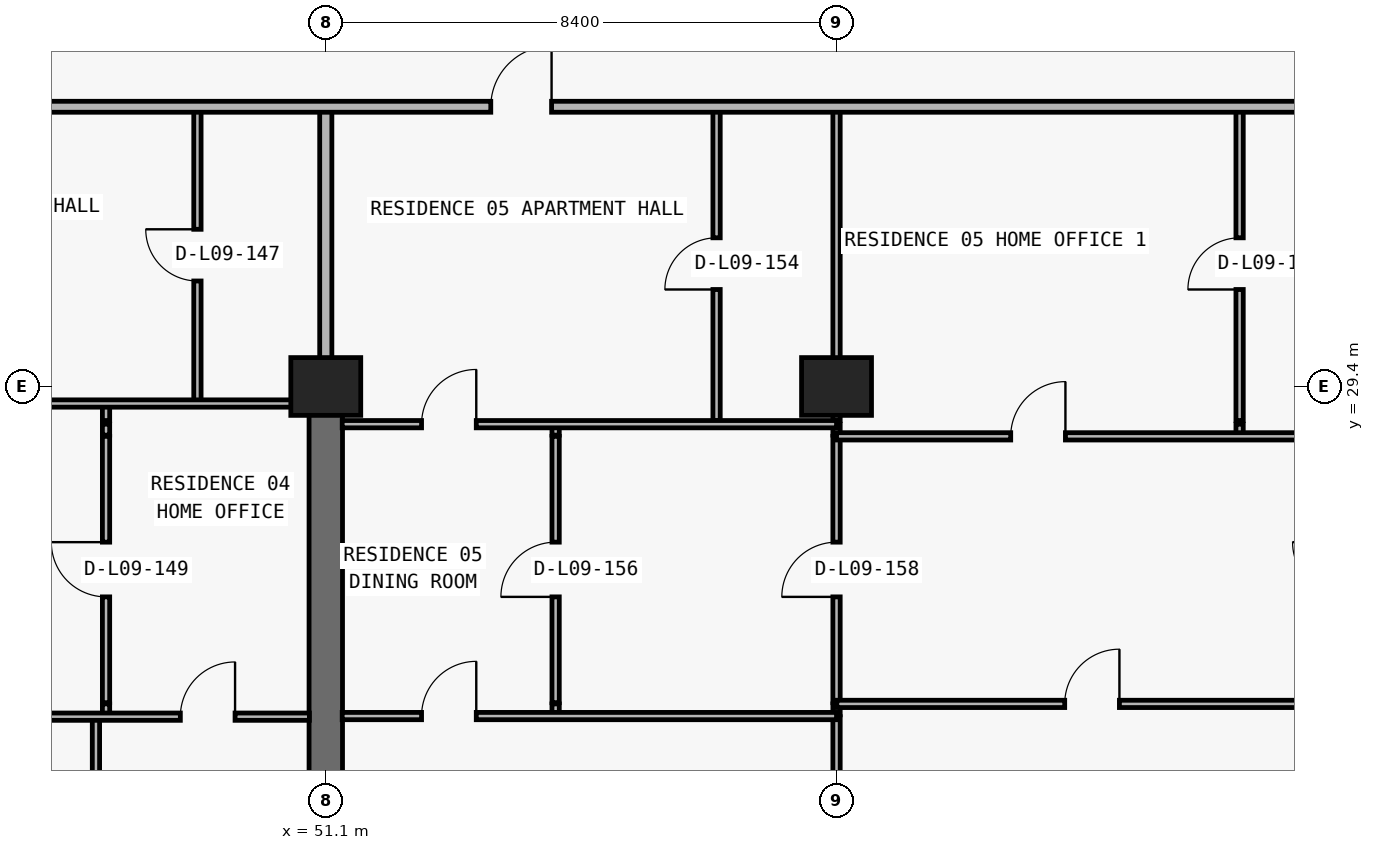
"""IFC4 building model, lengths in metres.
Left out: names, types, materials, properties, quantities, classifications, styles, units other than length and angle.
Written with IfcOpenShell. Run it as: python <this file> out.ifc"""

import sys

from ifc_helpers import new_model, si_unit, direction, frame, frame_2d, origin, origin_2d, place, context, subcontext, project, spatial, rectangle, extrude, element, fill, save


model = new_model("IFC4")
c1 = context("Model", 3, precision=1e-05, world=origin(), true_north=direction((0.0, 1.0)))
c2 = subcontext(c1, "Body", "Model", "MODEL_VIEW")
j1 = project(units=[si_unit("LENGTHUNIT", "METRE"), si_unit("PLANEANGLEUNIT", "RADIAN")], contexts=[c1])
p1 = place(None, origin())
s1 = spatial("IfcSite", under=j1, at=p1, CompositionType="ELEMENT")
p2 = place(p1, origin())
s2 = spatial("IfcBuilding", under=s1, at=p2, CompositionType="ELEMENT")
p3 = place(p2, frame((0.0, 0.0, 39.9)))
s3 = spatial("IfcBuildingStorey", under=s2, at=p3, CompositionType="ELEMENT", Elevation=39.9)
for number, where, z_axis, x_axis in (
    (1, (51.1, 29.4, 0.0), (0.0, 0.0, 1.0), (1.0, 0.0, 0.0)),
    (2, (59.5, 29.4, 0.0), (0.0, 0.0, 1.0), (1.0, 0.0, 0.0)),
):
    element("IfcColumn", number, at=place(p3, frame(where, z_axis=z_axis, x_axis=x_axis)), inside=s3, PredefinedType="COLUMN", context=c2, shape_type="SweptSolid", body=[
        extrude(rectangle(XDim=1.15, YDim=0.95, at=origin_2d()), origin(), (0.0, 0.0, 1.0), 3.05),
    ])
p4 = place(p3, frame((51.1, 20.8, 0.0), z_axis=(0.0, 0.0, 1.0), x_axis=(0.0, 1.0, 0.0)))
e3 = element("IfcWall", 3, at=p4, inside=s3, PredefinedType="SHEAR", context=c2, shape_type="SweptSolid", body=[
    extrude(rectangle(XDim=8.6, YDim=0.55, at=frame_2d((4.3, 0.0))), origin(), (0.0, 0.0, 1.0), 3.05),
])
p5 = place(p3, frame((47.32, 6.24, 0.0), z_axis=(0.0, 0.0, 1.0), x_axis=(0.0, 1.0, 0.0)))
e4 = element("IfcWall", 4, at=p5, inside=s3, PredefinedType="PARTITIONING", context=c2, shape_type="SweptSolid", body=[
    extrude(rectangle(XDim=17.73, YDim=0.12, at=frame_2d((8.865, 0.0))), origin(), (0.0, 0.0, 1.0), 3.05),
])
p6 = place(p3, frame((47.486, 24.0, 0.0), z_axis=(0.0, 0.0, 1.0), x_axis=(0.0, 1.0, 0.0)))
e5 = element("IfcWall", 5, at=p6, inside=s3, PredefinedType="PARTITIONING", context=c2, shape_type="SweptSolid", body=[
    extrude(rectangle(XDim=0.18, YDim=0.12, at=frame_2d((0.09, 0.0))), origin(), (0.0, 0.0, 1.0), 3.05),
])
p7 = place(p3, frame((47.486, 24.2, 0.0), z_axis=(0.0, 0.0, 1.0), x_axis=(0.0, 1.0, 0.0)))
e6 = element("IfcWall", 6, at=p7, inside=s3, PredefinedType="PARTITIONING", context=c2, shape_type="SweptSolid", body=[
    extrude(rectangle(XDim=4.38, YDim=0.12, at=frame_2d((2.19, 0.0))), origin(), (0.0, 0.0, 1.0), 3.05),
])
p8 = place(p7, frame((1.74, 0.0, 0.0)))
e7 = element("IfcOpeningElement", 7, at=p8, cuts=e6, PredefinedType="OPENING", context=c2, shape_type="SweptSolid", body=[
    extrude(rectangle(XDim=0.9, YDim=2.15, at=frame_2d((0.45, 1.075))), frame((0.0, 0.07, 0.0), z_axis=(0.0, -1.0, 0.0), x_axis=(1.0, 0.0, 0.0)), (0.0, 0.0, 1.0), 0.14),
])
p9 = place(p3, frame((47.486, 28.6, 0.0), z_axis=(0.0, 0.0, 1.0), x_axis=(0.0, 1.0, 0.0)))
e8 = element("IfcWall", 8, at=p9, inside=s3, PredefinedType="PARTITIONING", context=c2, shape_type="SweptSolid", body=[
    extrude(rectangle(XDim=0.18, YDim=0.12, at=frame_2d((0.09, 0.0))), origin(), (0.0, 0.0, 1.0), 3.05),
])
p10 = place(p3, frame((47.486, 28.84, 0.0), z_axis=(0.0, 0.0, 1.0), x_axis=(0.0, 1.0, 0.0)))
e9 = element("IfcWall", 9, at=p10, inside=s3, PredefinedType="PARTITIONING", context=c2, shape_type="SweptSolid", body=[
    extrude(rectangle(XDim=0.28, YDim=0.12, at=frame_2d((0.14, 0.0))), origin(), (0.0, 0.0, 1.0), 3.05),
])
p11 = place(p3, frame((48.989, 29.12, 0.0), z_axis=(0.0, 0.0, 1.0), x_axis=(0.0, 1.0, 0.0)))
e10 = element("IfcWall", 10, at=p11, inside=s3, PredefinedType="PARTITIONING", context=c2, shape_type="SweptSolid", body=[
    extrude(rectangle(XDim=4.88, YDim=0.12, at=frame_2d((2.44, 0.0))), origin(), (0.0, 0.0, 1.0), 2.578),
])
p12 = place(p11, frame((2.015, 0.0, 0.0)))
e11 = element("IfcOpeningElement", 11, at=p12, cuts=e10, PredefinedType="OPENING", context=c2, shape_type="SweptSolid", body=[
    extrude(rectangle(XDim=0.85, YDim=2.1, at=frame_2d((0.425, 1.05))), frame((0.0, 0.07, 0.0), z_axis=(0.0, -1.0, 0.0), x_axis=(1.0, 0.0, 0.0)), (0.0, 0.0, 1.0), 0.14),
])
p13 = place(p3, frame((51.1, 29.405, 0.0), z_axis=(0.0, 0.0, 1.0), x_axis=(0.0, 1.0, 0.0)))
e12 = element("IfcWall", 12, at=p13, inside=s3, PredefinedType="PARTITIONING", context=c2, shape_type="SweptSolid", body=[
    extrude(rectangle(XDim=4.595, YDim=0.2, at=frame_2d((2.297, 0.0))), origin(), (0.0, 0.0, 1.0), 2.335),
])
p14 = place(p3, frame((54.88, 24.0, 0.0), z_axis=(0.0, 0.0, 1.0), x_axis=(0.0, 1.0, 0.0)))
e13 = element("IfcWall", 13, at=p14, inside=s3, PredefinedType="PARTITIONING", context=c2, shape_type="SweptSolid", body=[
    extrude(rectangle(XDim=0.18, YDim=0.12, at=frame_2d((0.09, 0.0))), origin(), (0.0, 0.0, 1.0), 3.05),
])
p15 = place(p3, frame((54.88, 24.2, 0.0), z_axis=(0.0, 0.0, 1.0), x_axis=(0.0, 1.0, 0.0)))
e14 = element("IfcWall", 14, at=p15, inside=s3, PredefinedType="PARTITIONING", context=c2, shape_type="SweptSolid", body=[
    extrude(rectangle(XDim=4.38, YDim=0.12, at=frame_2d((2.19, 0.0))), origin(), (0.0, 0.0, 1.0), 3.05),
])
p16 = place(p15, frame((1.74, 0.0, 0.0)))
e15 = element("IfcOpeningElement", 15, at=p16, cuts=e14, PredefinedType="OPENING", context=c2, shape_type="SweptSolid", body=[
    extrude(rectangle(XDim=0.9, YDim=2.15, at=frame_2d((0.45, 1.075))), frame((0.0, 0.07, 0.0), z_axis=(0.0, -1.0, 0.0), x_axis=(1.0, 0.0, 0.0)), (0.0, 0.0, 1.0), 0.14),
])
p17 = place(p3, frame((54.88, 28.6, 0.0), z_axis=(0.0, 0.0, 1.0), x_axis=(0.0, 1.0, 0.0)))
e16 = element("IfcWall", 16, at=p17, inside=s3, PredefinedType="PARTITIONING", context=c2, shape_type="SweptSolid", body=[
    extrude(rectangle(XDim=0.18, YDim=0.12, at=frame_2d((0.09, 0.0))), origin(), (0.0, 0.0, 1.0), 3.05),
])
p18 = place(p3, frame((57.527, 28.84, 0.0), z_axis=(0.0, 0.0, 1.0), x_axis=(0.0, 1.0, 0.0)))
e17 = element("IfcWall", 17, at=p18, inside=s3, PredefinedType="PARTITIONING", context=c2, shape_type="SweptSolid", body=[
    extrude(rectangle(XDim=5.16, YDim=0.12, at=frame_2d((2.58, 0.0))), origin(), (0.0, 0.0, 1.0), 2.578),
])
p19 = place(p18, frame((2.155, 0.0, 0.0)))
e18 = element("IfcOpeningElement", 18, at=p19, cuts=e17, PredefinedType="OPENING", context=c2, shape_type="SweptSolid", body=[
    extrude(rectangle(XDim=0.85, YDim=2.1, at=frame_2d((0.425, 1.05))), frame((0.0, 0.07, 0.0), z_axis=(0.0, -1.0, 0.0), x_axis=(1.0, 0.0, 0.0)), (0.0, 0.0, 1.0), 0.14),
])
p20 = place(p3, frame((59.5, 6.24, 0.0), z_axis=(0.0, 0.0, 1.0), x_axis=(0.0, 1.0, 0.0)))
e19 = element("IfcWall", 19, at=p20, inside=s3, PredefinedType="PARTITIONING", context=c2, shape_type="SweptSolid", body=[
    extrude(rectangle(XDim=17.73, YDim=0.12, at=frame_2d((8.865, 0.0))), origin(), (0.0, 0.0, 1.0), 2.11),
])
p21 = place(p3, frame((59.5, 24.0, 0.0), z_axis=(0.0, 0.0, 1.0), x_axis=(0.0, 1.0, 0.0)))
e20 = element("IfcWall", 20, at=p21, inside=s3, PredefinedType="PARTITIONING", context=c2, shape_type="SweptSolid", body=[
    extrude(rectangle(XDim=0.18, YDim=0.12, at=frame_2d((0.09, 0.0))), origin(), (0.0, 0.0, 1.0), 2.11),
])
p22 = place(p3, frame((59.5, 24.2, 0.0), z_axis=(0.0, 0.0, 1.0), x_axis=(0.0, 1.0, 0.0)))
e21 = element("IfcWall", 21, at=p22, inside=s3, PredefinedType="PARTITIONING", context=c2, shape_type="SweptSolid", body=[
    extrude(rectangle(XDim=4.38, YDim=0.12, at=frame_2d((2.19, 0.0))), origin(), (0.0, 0.0, 1.0), 2.11),
])
p23 = place(p22, frame((1.74, 0.0, 0.0)))
e22 = element("IfcOpeningElement", 22, at=p23, cuts=e21, PredefinedType="OPENING", context=c2, shape_type="SweptSolid", body=[
    extrude(rectangle(XDim=0.9, YDim=2.06, at=frame_2d((0.45, 1.03))), frame((0.0, 0.07, 0.0), z_axis=(0.0, -1.0, 0.0), x_axis=(1.0, 0.0, 0.0)), (0.0, 0.0, 1.0), 0.14),
])
p24 = place(p3, frame((59.5, 28.6, 0.0), z_axis=(0.0, 0.0, 1.0), x_axis=(0.0, 1.0, 0.0)))
e23 = element("IfcWall", 23, at=p24, inside=s3, PredefinedType="PARTITIONING", context=c2, shape_type="SweptSolid", body=[
    extrude(rectangle(XDim=0.18, YDim=0.12, at=frame_2d((0.09, 0.0))), origin(), (0.0, 0.0, 1.0), 2.11),
])
p25 = place(p3, frame((59.5, 28.84, 0.0), z_axis=(0.0, 0.0, 1.0), x_axis=(0.0, 1.0, 0.0)))
e24 = element("IfcWall", 24, at=p25, inside=s3, PredefinedType="PARTITIONING", context=c2, shape_type="SweptSolid", body=[
    extrude(rectangle(XDim=5.16, YDim=0.12, at=frame_2d((2.58, 0.0))), origin(), (0.0, 0.0, 1.0), 2.11),
])
p26 = place(p3, frame((66.129, 28.6, 0.0), z_axis=(0.0, 0.0, 1.0), x_axis=(0.0, 1.0, 0.0)))
e25 = element("IfcWall", 25, at=p26, inside=s3, PredefinedType="PARTITIONING", context=c2, shape_type="SweptSolid", body=[
    extrude(rectangle(XDim=0.18, YDim=0.12, at=frame_2d((0.09, 0.0))), origin(), (0.0, 0.0, 1.0), 3.05),
])
p27 = place(p3, frame((66.129, 28.84, 0.0), z_axis=(0.0, 0.0, 1.0), x_axis=(0.0, 1.0, 0.0)))
e26 = element("IfcWall", 26, at=p27, inside=s3, PredefinedType="PARTITIONING", context=c2, shape_type="SweptSolid", body=[
    extrude(rectangle(XDim=5.16, YDim=0.12, at=frame_2d((2.58, 0.0))), origin(), (0.0, 0.0, 1.0), 3.05),
])
p28 = place(p27, frame((2.155, 0.0, 0.0)))
e27 = element("IfcOpeningElement", 27, at=p28, cuts=e26, PredefinedType="OPENING", context=c2, shape_type="SweptSolid", body=[
    extrude(rectangle(XDim=0.85, YDim=2.1, at=frame_2d((0.425, 1.05))), frame((0.0, 0.07, 0.0), z_axis=(0.0, -1.0, 0.0), x_axis=(1.0, 0.0, 0.0)), (0.0, 0.0, 1.0), 0.14),
])
p29 = place(p3, frame((42.7, 23.97, 0.0), z_axis=(0.0, 0.0, 1.0), x_axis=(1.0, 0.0, 0.0)))
e28 = element("IfcWall", 28, at=p29, inside=s3, PredefinedType="PARTITIONING", context=c2, shape_type="SweptSolid", body=[
    extrude(rectangle(XDim=8.13, YDim=0.12, at=frame_2d((4.065, 0.0))), origin(), (0.0, 0.0, 1.0), 3.05),
])
p30 = place(p29, frame((1.86, 0.0, 0.0)))
e29 = element("IfcOpeningElement", 29, at=p30, cuts=e28, PredefinedType="OPENING", context=c2, shape_type="SweptSolid", body=[
    extrude(rectangle(XDim=0.9, YDim=2.15, at=frame_2d((0.45, 1.075))), frame((0.0, 0.07, 0.0), z_axis=(0.0, -1.0, 0.0), x_axis=(1.0, 0.0, 0.0)), (0.0, 0.0, 1.0), 0.14),
])
p31 = place(p29, frame((6.008, 0.0, 0.0)))
e30 = element("IfcOpeningElement", 30, at=p31, cuts=e28, PredefinedType="OPENING", context=c2, shape_type="SweptSolid", body=[
    extrude(rectangle(XDim=0.9, YDim=2.15, at=frame_2d((0.45, 1.075))), frame((0.0, 0.07, 0.0), z_axis=(0.0, -1.0, 0.0), x_axis=(1.0, 0.0, 0.0)), (0.0, 0.0, 1.0), 0.14),
])
p32 = place(p3, frame((51.37, 23.98, 0.0), z_axis=(0.0, 0.0, 1.0), x_axis=(1.0, 0.0, 0.0)))
e31 = element("IfcWall", 31, at=p32, inside=s3, PredefinedType="PARTITIONING", context=c2, shape_type="SweptSolid", body=[
    extrude(rectangle(XDim=8.13, YDim=0.12, at=frame_2d((4.065, 0.0))), origin(), (0.0, 0.0, 1.0), 3.05),
])
p33 = place(p32, frame((1.305, 0.0, 0.0)))
e32 = element("IfcOpeningElement", 32, at=p33, cuts=e31, PredefinedType="OPENING", context=c2, shape_type="SweptSolid", body=[
    extrude(rectangle(XDim=0.9, YDim=2.15, at=frame_2d((0.45, 1.075))), frame((0.0, 0.07, 0.0), z_axis=(0.0, -1.0, 0.0), x_axis=(1.0, 0.0, 0.0)), (0.0, 0.0, 1.0), 0.14),
])
p34 = place(p3, frame((59.505, 24.18, 0.0), z_axis=(0.0, 0.0, 1.0), x_axis=(1.0, 0.0, 0.0)))
e33 = element("IfcWall", 33, at=p34, inside=s3, PredefinedType="PARTITIONING", context=c2, shape_type="SweptSolid", body=[
    extrude(rectangle(XDim=8.395, YDim=0.12, at=frame_2d((4.198, 0.0))), origin(), (0.0, 0.0, 1.0), 3.05),
])
p35 = place(p34, frame((3.748, 0.0, 0.0)))
e34 = element("IfcOpeningElement", 34, at=p35, cuts=e33, PredefinedType="OPENING", context=c2, shape_type="SweptSolid", body=[
    extrude(rectangle(XDim=0.9, YDim=2.15, at=frame_2d((0.45, 1.075))), frame((0.0, 0.07, 0.0), z_axis=(0.0, -1.0, 0.0), x_axis=(1.0, 0.0, 0.0)), (0.0, 0.0, 1.0), 0.14),
])
p36 = place(p3, frame((59.5, 28.58, 0.0), z_axis=(0.0, 0.0, 1.0), x_axis=(1.0, 0.0, 0.0)))
e35 = element("IfcWall", 35, at=p36, inside=s3, PredefinedType="PARTITIONING", context=c2, shape_type="SweptSolid", body=[
    extrude(rectangle(XDim=8.4, YDim=0.12, at=frame_2d((4.2, 0.0))), origin(), (0.0, 0.0, 1.0), 3.05),
])
p37 = place(p36, frame((2.865, 0.0, 0.0)))
e36 = element("IfcOpeningElement", 36, at=p37, cuts=e35, PredefinedType="OPENING", context=c2, shape_type="SweptSolid", body=[
    extrude(rectangle(XDim=0.9, YDim=2.15, at=frame_2d((0.45, 1.075))), frame((0.0, 0.07, 0.0), z_axis=(0.0, -1.0, 0.0), x_axis=(1.0, 0.0, 0.0)), (0.0, 0.0, 1.0), 0.14),
])
p38 = place(p3, frame((51.37, 28.78, 0.0), z_axis=(0.0, 0.0, 1.0), x_axis=(1.0, 0.0, 0.0)))
e37 = element("IfcWall", 37, at=p38, inside=s3, PredefinedType="PARTITIONING", context=c2, shape_type="SweptSolid", body=[
    extrude(rectangle(XDim=8.13, YDim=0.12, at=frame_2d((4.065, 0.0))), origin(), (0.0, 0.0, 1.0), 3.05),
])
p39 = place(p38, frame((1.305, 0.0, 0.0)))
e38 = element("IfcOpeningElement", 38, at=p39, cuts=e37, PredefinedType="OPENING", context=c2, shape_type="SweptSolid", body=[
    extrude(rectangle(XDim=0.9, YDim=2.15, at=frame_2d((0.45, 1.075))), frame((0.0, 0.07, 0.0), z_axis=(0.0, -1.0, 0.0), x_axis=(1.0, 0.0, 0.0)), (0.0, 0.0, 1.0), 0.14),
])
p40 = place(p3, frame((42.7, 29.12, 0.0), z_axis=(0.0, 0.0, 1.0), x_axis=(1.0, 0.0, 0.0)))
e39 = element("IfcWall", 39, at=p40, inside=s3, PredefinedType="PARTITIONING", context=c2, shape_type="SweptSolid", body=[
    extrude(rectangle(XDim=8.13, YDim=0.12, at=frame_2d((4.065, 0.0))), origin(), (0.0, 0.0, 1.0), 2.11),
])
p41 = place(p40, frame((1.943, 0.0, 0.0)))
e40 = element("IfcOpeningElement", 40, at=p41, cuts=e39, PredefinedType="OPENING", context=c2, shape_type="SweptSolid", body=[
    extrude(rectangle(XDim=0.9, YDim=2.06, at=frame_2d((0.45, 1.03))), frame((0.0, 0.07, 0.0), z_axis=(0.0, -1.0, 0.0), x_axis=(1.0, 0.0, 0.0)), (0.0, 0.0, 1.0), 0.14),
])
p42 = place(p3, frame((5.105, 34.0, 0.0), z_axis=(0.0, 0.0, 1.0), x_axis=(1.0, 0.0, 0.0)))
e41 = element("IfcWall", 41, at=p42, inside=s3, PredefinedType="PARTITIONING", context=c2, shape_type="SweptSolid", body=[
    extrude(rectangle(XDim=67.595, YDim=0.18, at=frame_2d((33.797, 0.0))), origin(), (0.0, 0.0, 1.0), 3.05),
])
p43 = place(p42, frame((7.504, 0.0, 0.0)))
e42 = element("IfcOpeningElement", 42, at=p43, cuts=e41, PredefinedType="OPENING", context=c2, shape_type="SweptSolid", body=[
    extrude(rectangle(XDim=1.0, YDim=2.2, at=frame_2d((0.5, 1.1))), frame((0.0, 0.1, 0.0), z_axis=(0.0, -1.0, 0.0), x_axis=(1.0, 0.0, 0.0)), (0.0, 0.0, 1.0), 0.2),
])
p44 = place(p42, frame((24.213, 0.0, 0.0)))
e43 = element("IfcOpeningElement", 43, at=p44, cuts=e41, PredefinedType="OPENING", context=c2, shape_type="SweptSolid", body=[
    extrude(rectangle(XDim=1.0, YDim=2.2, at=frame_2d((0.5, 1.1))), frame((0.0, 0.1, 0.0), z_axis=(0.0, -1.0, 0.0), x_axis=(1.0, 0.0, 0.0)), (0.0, 0.0, 1.0), 0.2),
])
p45 = place(p42, frame((32.365, 0.0, 0.0)))
e44 = element("IfcOpeningElement", 44, at=p45, cuts=e41, PredefinedType="OPENING", context=c2, shape_type="SweptSolid", body=[
    extrude(rectangle(XDim=1.0, YDim=2.2, at=frame_2d((0.5, 1.1))), frame((0.0, 0.1, 0.0), z_axis=(0.0, -1.0, 0.0), x_axis=(1.0, 0.0, 0.0)), (0.0, 0.0, 1.0), 0.2),
])
p46 = place(p42, frame((40.24, 0.0, 0.0)))
e45 = element("IfcOpeningElement", 45, at=p46, cuts=e41, PredefinedType="OPENING", context=c2, shape_type="SweptSolid", body=[
    extrude(rectangle(XDim=1.0, YDim=2.2, at=frame_2d((0.5, 1.1))), frame((0.0, 0.1, 0.0), z_axis=(0.0, -1.0, 0.0), x_axis=(1.0, 0.0, 0.0)), (0.0, 0.0, 1.0), 0.2),
])
p47 = place(p42, frame((48.708, 0.0, 0.0)))
e46 = element("IfcOpeningElement", 46, at=p47, cuts=e41, PredefinedType="OPENING", context=c2, shape_type="SweptSolid", body=[
    extrude(rectangle(XDim=1.0, YDim=2.2, at=frame_2d((0.5, 1.1))), frame((0.0, 0.1, 0.0), z_axis=(0.0, -1.0, 0.0), x_axis=(1.0, 0.0, 0.0)), (0.0, 0.0, 1.0), 0.2),
])
p48 = place(p12, origin())
e47 = element("IfcDoor", 47, at=p48, inside=s3, OperationType="SINGLE_SWING_RIGHT", PredefinedType="DOOR", context=c2, shape_type="SweptSolid", body=[
    extrude(rectangle(XDim=0.85, YDim=2.1, at=frame_2d((0.425, 1.05))), frame((0.0, 0.025, 0.0), z_axis=(0.0, -1.0, 0.0), x_axis=(1.0, 0.0, 0.0)), (0.0, 0.0, 1.0), 0.05),
])
fill(e11, e47)
p49 = place(p8, origin())
e48 = element("IfcDoor", 48, at=p49, inside=s3, OperationType="SINGLE_SWING_RIGHT", PredefinedType="DOOR", context=c2, shape_type="SweptSolid", body=[
    extrude(rectangle(XDim=0.9, YDim=2.15, at=frame_2d((0.45, 1.075))), frame((0.0, 0.025, 0.0), z_axis=(0.0, -1.0, 0.0), x_axis=(1.0, 0.0, 0.0)), (0.0, 0.0, 1.0), 0.05),
])
fill(e7, e48)
p50 = place(p31, origin())
e49 = element("IfcDoor", 49, at=p50, inside=s3, OperationType="SINGLE_SWING_RIGHT", PredefinedType="DOOR", context=c2, shape_type="SweptSolid", body=[
    extrude(rectangle(XDim=0.9, YDim=2.15, at=frame_2d((0.45, 1.075))), frame((0.0, 0.025, 0.0), z_axis=(0.0, -1.0, 0.0), x_axis=(1.0, 0.0, 0.0)), (0.0, 0.0, 1.0), 0.05),
])
fill(e30, e49)
p51 = place(p47, origin())
e50 = element("IfcDoor", 50, at=p51, inside=s3, OperationType="SINGLE_SWING_RIGHT", PredefinedType="DOOR", context=c2, shape_type="SweptSolid", body=[
    extrude(rectangle(XDim=1.0, YDim=2.2, at=frame_2d((0.5, 1.1))), frame((0.0, 0.025, 0.0), z_axis=(0.0, -1.0, 0.0), x_axis=(1.0, 0.0, 0.0)), (0.0, 0.0, 1.0), 0.05),
])
fill(e46, e50)
p52 = place(p19, origin())
e51 = element("IfcDoor", 51, at=p52, inside=s3, OperationType="SINGLE_SWING_LEFT", PredefinedType="DOOR", context=c2, shape_type="SweptSolid", body=[
    extrude(rectangle(XDim=0.85, YDim=2.1, at=frame_2d((0.425, 1.05))), frame((0.0, 0.025, 0.0), z_axis=(0.0, -1.0, 0.0), x_axis=(1.0, 0.0, 0.0)), (0.0, 0.0, 1.0), 0.05),
])
fill(e18, e51)
p53 = place(p39, origin())
e52 = element("IfcDoor", 52, at=p53, inside=s3, OperationType="SINGLE_SWING_RIGHT", PredefinedType="DOOR", context=c2, shape_type="SweptSolid", body=[
    extrude(rectangle(XDim=0.9, YDim=2.15, at=frame_2d((0.45, 1.075))), frame((0.0, 0.025, 0.0), z_axis=(0.0, -1.0, 0.0), x_axis=(1.0, 0.0, 0.0)), (0.0, 0.0, 1.0), 0.05),
])
fill(e38, e52)
p54 = place(p16, origin())
e53 = element("IfcDoor", 53, at=p54, inside=s3, OperationType="SINGLE_SWING_LEFT", PredefinedType="DOOR", context=c2, shape_type="SweptSolid", body=[
    extrude(rectangle(XDim=0.9, YDim=2.15, at=frame_2d((0.45, 1.075))), frame((0.0, 0.025, 0.0), z_axis=(0.0, -1.0, 0.0), x_axis=(1.0, 0.0, 0.0)), (0.0, 0.0, 1.0), 0.05),
])
fill(e15, e53)
p55 = place(p33, origin())
e54 = element("IfcDoor", 54, at=p55, inside=s3, OperationType="SINGLE_SWING_RIGHT", PredefinedType="DOOR", context=c2, shape_type="SweptSolid", body=[
    extrude(rectangle(XDim=0.9, YDim=2.15, at=frame_2d((0.45, 1.075))), frame((0.0, 0.025, 0.0), z_axis=(0.0, -1.0, 0.0), x_axis=(1.0, 0.0, 0.0)), (0.0, 0.0, 1.0), 0.05),
])
fill(e32, e54)
p56 = place(p23, origin())
e55 = element("IfcDoor", 55, at=p56, inside=s3, OperationType="SINGLE_SWING_LEFT", PredefinedType="DOOR", context=c2, shape_type="SweptSolid", body=[
    extrude(rectangle(XDim=0.9, YDim=2.06, at=frame_2d((0.45, 1.03))), frame((0.0, 0.025, 0.0), z_axis=(0.0, -1.0, 0.0), x_axis=(1.0, 0.0, 0.0)), (0.0, 0.0, 1.0), 0.05),
])
fill(e22, e55)
p57 = place(p37, origin())
e56 = element("IfcDoor", 56, at=p57, inside=s3, OperationType="SINGLE_SWING_RIGHT", PredefinedType="DOOR", context=c2, shape_type="SweptSolid", body=[
    extrude(rectangle(XDim=0.9, YDim=2.15, at=frame_2d((0.45, 1.075))), frame((0.0, 0.025, 0.0), z_axis=(0.0, -1.0, 0.0), x_axis=(1.0, 0.0, 0.0)), (0.0, 0.0, 1.0), 0.05),
])
fill(e36, e56)
p58 = place(p28, origin())
e57 = element("IfcDoor", 57, at=p58, inside=s3, OperationType="SINGLE_SWING_LEFT", PredefinedType="DOOR", context=c2, shape_type="SweptSolid", body=[
    extrude(rectangle(XDim=0.85, YDim=2.1, at=frame_2d((0.425, 1.05))), frame((0.0, 0.025, 0.0), z_axis=(0.0, -1.0, 0.0), x_axis=(1.0, 0.0, 0.0)), (0.0, 0.0, 1.0), 0.05),
])
fill(e27, e57)
p59 = place(p35, origin())
e58 = element("IfcDoor", 58, at=p59, inside=s3, OperationType="SINGLE_SWING_RIGHT", PredefinedType="DOOR", context=c2, shape_type="SweptSolid", body=[
    extrude(rectangle(XDim=0.9, YDim=2.15, at=frame_2d((0.45, 1.075))), frame((0.0, 0.025, 0.0), z_axis=(0.0, -1.0, 0.0), x_axis=(1.0, 0.0, 0.0)), (0.0, 0.0, 1.0), 0.05),
])
fill(e34, e58)
save(model, sys.argv[1])
